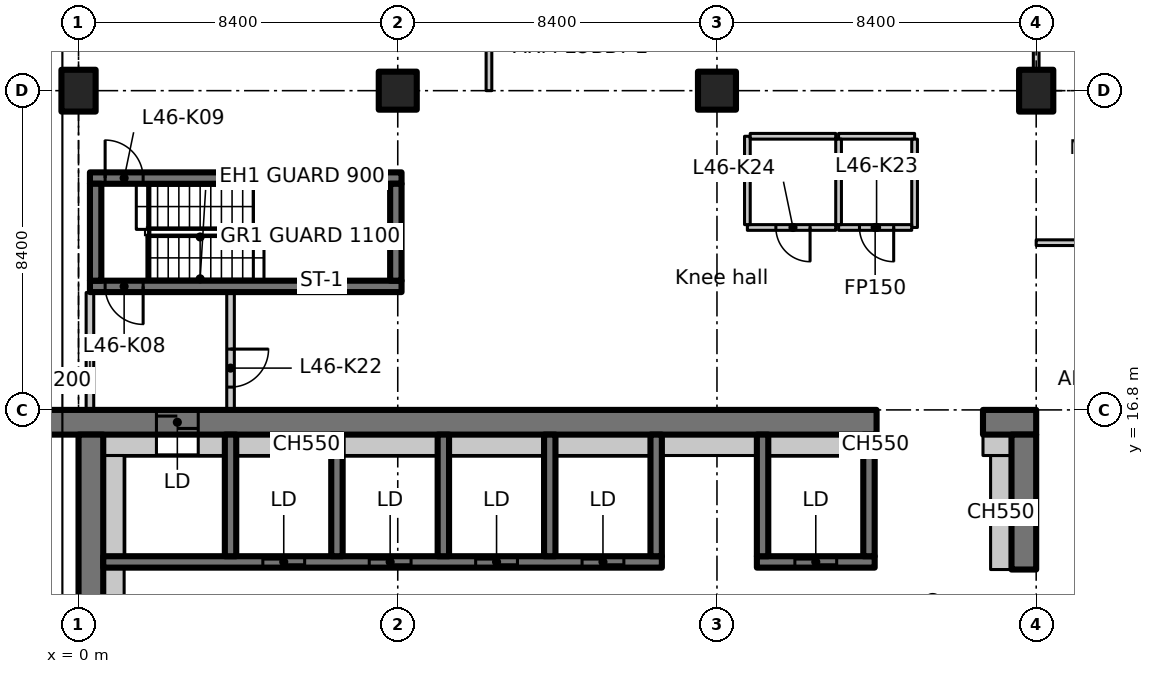
"""IFC4 building model, lengths in metres.
Left out: names, types, materials, properties, quantities, classifications, styles, units other than length and angle.
Written with IfcOpenShell. Run it as: python <this file> out.ifc"""

import sys

from ifc_helpers import new_model, si_unit, direction, frame, frame_2d, origin, origin_2d, place, context, subcontext, project, spatial, polyline, rectangle, outline, extrude, element, fill, save


model = new_model("IFC4")
c1 = context("Model", 3, precision=1e-05, world=origin(), true_north=direction((0.0, 1.0)))
c2 = subcontext(c1, "Body", "Model", "MODEL_VIEW")
j1 = project(units=[si_unit("LENGTHUNIT", "METRE"), si_unit("PLANEANGLEUNIT", "RADIAN")], contexts=[c1])
p1 = place(None, origin())
s1 = spatial("IfcSite", under=j1, at=p1, CompositionType="ELEMENT")
p2 = place(p1, origin())
s2 = spatial("IfcBuilding", under=s1, at=p2, CompositionType="ELEMENT")
p3 = place(p2, frame((0.0, 0.0, 184.8)))
s3 = spatial("IfcBuildingStorey", under=s2, at=p3, CompositionType="ELEMENT", Elevation=184.8)
p4 = place(p3, frame((0.0, 25.2, 0.0), z_axis=(0.0, 0.0, 1.0), x_axis=(1.0, 0.0, 0.0)))
e1 = element("IfcColumn", 1, at=p4, inside=s3, PredefinedType="COLUMN", context=c2, shape_type="SweptSolid", body=[
    extrude(rectangle(XDim=0.9, YDim=1.1, at=origin_2d()), origin(), (0.0, 0.0, 1.0), 3.35),
])
for number, where, z_axis, x_axis in (
    (2, (8.4, 25.2, 0.0), (0.0, 0.0, 1.0), (1.0, 0.0, 0.0)),
    (3, (16.8, 25.2, 0.0), (0.0, 0.0, 1.0), (1.0, 0.0, 0.0)),
):
    element("IfcColumn", number, at=place(p3, frame(where, z_axis=z_axis, x_axis=x_axis)), inside=s3, PredefinedType="COLUMN", context=c2, shape_type="SweptSolid", body=[
        extrude(rectangle(XDim=1.0, YDim=1.0, at=origin_2d()), origin(), (0.0, 0.0, 1.0), 3.35),
    ])
p5 = place(p3, frame((25.2, 25.2, 0.0), z_axis=(0.0, 0.0, 1.0), x_axis=(1.0, 0.0, 0.0)))
e4 = element("IfcColumn", 4, at=p5, inside=s3, PredefinedType="COLUMN", context=c2, shape_type="SweptSolid", body=[
    extrude(rectangle(XDim=0.9, YDim=1.1, at=origin_2d()), origin(), (0.0, 0.0, 1.0), 3.35),
])
p6 = place(p3, frame((-1.1, 16.475, 0.0), z_axis=(0.0, 0.0, 1.0), x_axis=(1.0, 0.0, 0.0)))
e5 = element("IfcWall", 5, at=p6, inside=s3, PredefinedType="SHEAR", context=c2, shape_type="SweptSolid", body=[
    extrude(rectangle(XDim=22.1, YDim=0.65, at=frame_2d((11.05, 0.0))), origin(), (0.0, 0.0, 1.0), 3.35),
])
p7 = place(p6, frame((3.15, 0.0, 0.0)))
e6 = element("IfcOpeningElement", 6, at=p7, cuts=e5, PredefinedType="OPENING", context=c2, shape_type="SweptSolid", body=[
    extrude(rectangle(XDim=1.1, YDim=2.3, at=frame_2d((0.55, 1.15))), frame((0.0, 0.335, 0.0), z_axis=(0.0, -1.0, 0.0), x_axis=(1.0, 0.0, 0.0)), (0.0, 0.0, 1.0), 0.67),
])
p8 = place(p3, frame((23.8, 16.475, 0.0), z_axis=(0.0, 0.0, 1.0), x_axis=(1.0, 0.0, 0.0)))
e7 = element("IfcWall", 7, at=p8, inside=s3, PredefinedType="SHEAR", context=c2, shape_type="SweptSolid", body=[
    extrude(rectangle(XDim=1.4, YDim=0.65, at=frame_2d((0.7, 0.0))), origin(), (0.0, 0.0, 1.0), 3.35),
])
p9 = place(p3, frame((0.325, 7.286, 0.0), z_axis=(0.0, 0.0, 1.0), x_axis=(0.0, 1.0, 0.0)))
e8 = element("IfcWall", 8, at=p9, inside=s3, PredefinedType="SHEAR", context=c2, shape_type="SweptSolid", body=[
    extrude(rectangle(XDim=8.864, YDim=0.65, at=frame_2d((4.432, 0.0))), origin(), (0.0, 0.0, 1.0), 3.35),
])
p10 = place(p3, frame((24.875, 12.6, 0.0), z_axis=(0.0, 0.0, 1.0), x_axis=(0.0, 1.0, 0.0)))
e9 = element("IfcWall", 9, at=p10, inside=s3, PredefinedType="SHEAR", context=c2, shape_type="SweptSolid", body=[
    extrude(rectangle(XDim=3.55, YDim=0.65, at=frame_2d((1.775, 0.0))), origin(), (0.0, 0.0, 1.0), 3.35),
])
p11 = place(p3, frame((24.275, 12.6, 0.0), z_axis=(0.0, 0.0, 1.0), x_axis=(0.0, 1.0, 0.0)))
e10 = element("IfcWall", 10, at=p11, inside=s3, PredefinedType="PARTITIONING", context=c2, shape_type="SweptSolid", body=[
    extrude(rectangle(XDim=3.0, YDim=0.55, at=frame_2d((1.5, 0.0))), origin(), (0.0, 0.0, 1.0), 3.35),
])
p12 = place(p3, frame((0.65, 15.875, 0.0), z_axis=(0.0, 0.0, 1.0), x_axis=(1.0, 0.0, 0.0)))
e11 = element("IfcWall", 11, at=p12, inside=s3, PredefinedType="PARTITIONING", context=c2, shape_type="SweptSolid", body=[
    extrude(rectangle(XDim=1.4, YDim=0.55, at=frame_2d((0.7, 0.0))), origin(), (0.0, 0.0, 1.0), 3.35),
])
p13 = place(p3, frame((23.8, 15.875, 0.0), z_axis=(0.0, 0.0, 1.0), x_axis=(1.0, 0.0, 0.0)))
e12 = element("IfcWall", 12, at=p13, inside=s3, PredefinedType="PARTITIONING", context=c2, shape_type="SweptSolid", body=[
    extrude(rectangle(XDim=0.75, YDim=0.55, at=frame_2d((0.375, 0.0))), origin(), (0.0, 0.0, 1.0), 3.35),
])
p14 = place(p3, frame((0.65, 12.8, 0.0), z_axis=(0.0, 0.0, 1.0), x_axis=(1.0, 0.0, 0.0)))
e13 = element("IfcWall", 13, at=p14, inside=s3, PredefinedType="SHEAR", context=c2, shape_type="SweptSolid", body=[
    extrude(rectangle(XDim=14.7, YDim=0.3, at=frame_2d((7.35, 0.0))), origin(), (0.0, 0.0, 1.0), 3.35),
])
p15 = place(p14, frame((4.2, 0.0, 0.0)))
e14 = element("IfcOpeningElement", 14, at=p15, cuts=e13, PredefinedType="OPENING", context=c2, shape_type="SweptSolid", body=[
    extrude(rectangle(XDim=1.1, YDim=2.3, at=frame_2d((0.55, 1.15))), frame((0.0, 0.16, 0.0), z_axis=(0.0, -1.0, 0.0), x_axis=(1.0, 0.0, 0.0)), (0.0, 0.0, 1.0), 0.32),
])
p16 = place(p14, frame((7.0, 0.0, 0.0)))
e15 = element("IfcOpeningElement", 15, at=p16, cuts=e13, PredefinedType="OPENING", context=c2, shape_type="SweptSolid", body=[
    extrude(rectangle(XDim=1.1, YDim=2.3, at=frame_2d((0.55, 1.15))), frame((0.0, 0.16, 0.0), z_axis=(0.0, -1.0, 0.0), x_axis=(1.0, 0.0, 0.0)), (0.0, 0.0, 1.0), 0.32),
])
p17 = place(p14, frame((9.8, 0.0, 0.0)))
e16 = element("IfcOpeningElement", 16, at=p17, cuts=e13, PredefinedType="OPENING", context=c2, shape_type="SweptSolid", body=[
    extrude(rectangle(XDim=1.1, YDim=2.3, at=frame_2d((0.55, 1.15))), frame((0.0, 0.16, 0.0), z_axis=(0.0, -1.0, 0.0), x_axis=(1.0, 0.0, 0.0)), (0.0, 0.0, 1.0), 0.32),
])
p18 = place(p14, frame((12.6, 0.0, 0.0)))
e17 = element("IfcOpeningElement", 17, at=p18, cuts=e13, PredefinedType="OPENING", context=c2, shape_type="SweptSolid", body=[
    extrude(rectangle(XDim=1.1, YDim=2.3, at=frame_2d((0.55, 1.15))), frame((0.0, 0.16, 0.0), z_axis=(0.0, -1.0, 0.0), x_axis=(1.0, 0.0, 0.0)), (0.0, 0.0, 1.0), 0.32),
])
for number, where, z_axis, x_axis in (
    (18, (4.0, 12.95, 0.0), (0.0, 0.0, 1.0), (0.0, 1.0, 0.0)),
    (19, (6.8, 12.95, 0.0), (0.0, 0.0, 1.0), (0.0, 1.0, 0.0)),
    (20, (9.6, 12.95, 0.0), (0.0, 0.0, 1.0), (0.0, 1.0, 0.0)),
    (21, (12.4, 12.95, 0.0), (0.0, 0.0, 1.0), (0.0, 1.0, 0.0)),
    (22, (15.2, 12.95, 0.0), (0.0, 0.0, 1.0), (0.0, 1.0, 0.0)),
):
    element("IfcWall", number, at=place(p3, frame(where, z_axis=z_axis, x_axis=x_axis)), inside=s3, PredefinedType="SHEAR", context=c2, shape_type="SweptSolid", body=[
        extrude(rectangle(XDim=3.2, YDim=0.3, at=frame_2d((1.6, 0.0))), origin(), (0.0, 0.0, 1.0), 3.35),
    ])
p19 = place(p3, frame((17.85, 12.8, 0.0), z_axis=(0.0, 0.0, 1.0), x_axis=(1.0, 0.0, 0.0)))
e23 = element("IfcWall", 23, at=p19, inside=s3, PredefinedType="SHEAR", context=c2, shape_type="SweptSolid", body=[
    extrude(rectangle(XDim=3.1, YDim=0.3, at=frame_2d((1.55, 0.0))), origin(), (0.0, 0.0, 1.0), 3.35),
])
p20 = place(p19, frame((1.0, 0.0, 0.0)))
e24 = element("IfcOpeningElement", 24, at=p20, cuts=e23, PredefinedType="OPENING", context=c2, shape_type="SweptSolid", body=[
    extrude(rectangle(XDim=1.1, YDim=2.3, at=frame_2d((0.55, 1.15))), frame((0.0, 0.16, 0.0), z_axis=(0.0, -1.0, 0.0), x_axis=(1.0, 0.0, 0.0)), (0.0, 0.0, 1.0), 0.32),
])
for number, where, z_axis, x_axis in (
    (25, (18.0, 12.95, 0.0), (0.0, 0.0, 1.0), (0.0, 1.0, 0.0)),
    (26, (20.8, 12.95, 0.0), (0.0, 0.0, 1.0), (0.0, 1.0, 0.0)),
):
    element("IfcWall", number, at=place(p3, frame(where, z_axis=z_axis, x_axis=x_axis)), inside=s3, PredefinedType="SHEAR", context=c2, shape_type="SweptSolid", body=[
        extrude(rectangle(XDim=3.2, YDim=0.3, at=frame_2d((1.6, 0.0))), origin(), (0.0, 0.0, 1.0), 3.35),
    ])
p21 = place(p3, frame((8.5, 20.05, 0.0), z_axis=(0.0, 0.0, 1.0), x_axis=(-1.0, 0.0, 0.0)))
e27 = element("IfcWall", 27, at=p21, inside=s3, PredefinedType="SHEAR", context=c2, shape_type="SweptSolid", body=[
    extrude(rectangle(XDim=8.2, YDim=0.3, at=frame_2d((4.1, 0.0))), origin(), (0.0, 0.0, 1.0), 3.35),
])
p22 = place(p21, frame((6.8, 0.0, 0.0)))
e28 = element("IfcOpeningElement", 28, at=p22, cuts=e27, PredefinedType="OPENING", context=c2, shape_type="SweptSolid", body=[
    extrude(rectangle(XDim=1.0, YDim=2.1, at=frame_2d((0.5, 1.05))), frame((0.0, 0.16, 0.0), z_axis=(0.0, -1.0, 0.0), x_axis=(1.0, 0.0, 0.0)), (0.0, 0.0, 1.0), 0.32),
])
p23 = place(p3, frame((0.3, 22.9, 0.0), z_axis=(0.0, 0.0, 1.0), x_axis=(1.0, 0.0, 0.0)))
e29 = element("IfcWall", 29, at=p23, inside=s3, PredefinedType="SHEAR", context=c2, shape_type="SweptSolid", body=[
    extrude(rectangle(XDim=8.2, YDim=0.3, at=frame_2d((4.1, 0.0))), origin(), (0.0, 0.0, 1.0), 3.35),
])
p24 = place(p23, frame((0.4, 0.0, 0.0)))
e30 = element("IfcOpeningElement", 30, at=p24, cuts=e29, PredefinedType="OPENING", context=c2, shape_type="SweptSolid", body=[
    extrude(rectangle(XDim=1.0, YDim=2.1, at=frame_2d((0.5, 1.05))), frame((0.0, 0.16, 0.0), z_axis=(0.0, -1.0, 0.0), x_axis=(1.0, 0.0, 0.0)), (0.0, 0.0, 1.0), 0.32),
])
for number, where, z_axis, x_axis in (
    (31, (0.45, 20.2, 0.0), (0.0, 0.0, 1.0), (0.0, 1.0, 0.0)),
    (32, (8.35, 20.2, 0.0), (0.0, 0.0, 1.0), (0.0, 1.0, 0.0)),
):
    element("IfcWall", number, at=place(p3, frame(where, z_axis=z_axis, x_axis=x_axis)), inside=s3, PredefinedType="SHEAR", context=c2, shape_type="SweptSolid", body=[
        extrude(rectangle(XDim=2.55, YDim=0.3, at=frame_2d((1.275, 0.0))), origin(), (0.0, 0.0, 1.0), 3.35),
    ])
p25 = place(p3, frame((0.3, 16.812, 0.0), z_axis=(0.0, 0.0, 1.0), x_axis=(0.0, 1.0, 0.0)))
e33 = element("IfcWall", 33, at=p25, inside=s3, PredefinedType="PARTITIONING", context=c2, shape_type="SweptSolid", body=[
    extrude(rectangle(XDim=3.076, YDim=0.2, at=frame_2d((1.538, 0.0))), origin(), (0.0, 0.0, 1.0), 2.98),
])
p26 = place(p3, frame((4.0, 19.888, 0.0), z_axis=(0.0, 0.0, 1.0), x_axis=(0.0, -1.0, 0.0)))
e34 = element("IfcWall", 34, at=p26, inside=s3, PredefinedType="PARTITIONING", context=c2, shape_type="SweptSolid", body=[
    extrude(rectangle(XDim=3.076, YDim=0.2, at=frame_2d((1.538, 0.0))), origin(), (0.0, 0.0, 1.0), 3.35),
])
p27 = place(p26, frame((1.488, 0.0, 0.0)))
e35 = element("IfcOpeningElement", 35, at=p27, cuts=e34, PredefinedType="OPENING", context=c2, shape_type="SweptSolid", body=[
    extrude(rectangle(XDim=1.0, YDim=2.1, at=frame_2d((0.5, 1.05))), frame((0.0, 0.11, 0.0), z_axis=(0.0, -1.0, 0.0), x_axis=(1.0, 0.0, 0.0)), (0.0, 0.0, 1.0), 0.22),
])
p28 = place(p3, frame((20.0, 24.0, 0.0), z_axis=(0.0, 0.0, 1.0), x_axis=(1.0, 0.0, 0.0)))
e36 = element("IfcWall", 36, at=p28, inside=s3, PredefinedType="PARTITIONING", context=c2, shape_type="SweptSolid", body=[
    extrude(rectangle(XDim=2.0, YDim=0.15, at=frame_2d((1.0, 0.0))), origin(), (0.0, 0.0, 1.0), 3.35),
])
p29 = place(p3, frame((22.0, 23.925, 0.0), z_axis=(0.0, 0.0, 1.0), x_axis=(0.0, -1.0, 0.0)))
e37 = element("IfcWall", 37, at=p29, inside=s3, PredefinedType="PARTITIONING", context=c2, shape_type="SweptSolid", body=[
    extrude(rectangle(XDim=2.325, YDim=0.15, at=frame_2d((1.163, 0.0))), origin(), (0.0, 0.0, 1.0), 3.35),
])
p30 = place(p3, frame((21.925, 21.6, 0.0), z_axis=(0.0, 0.0, 1.0), x_axis=(-1.0, 0.0, 0.0)))
e38 = element("IfcWall", 38, at=p30, inside=s3, PredefinedType="PARTITIONING", context=c2, shape_type="SweptSolid", body=[
    extrude(rectangle(XDim=1.925, YDim=0.15, at=frame_2d((0.962, 0.0))), origin(), (0.0, 0.0, 1.0), 3.35),
])
p31 = place(p30, frame((0.475, 0.0, 0.0)))
e39 = element("IfcOpeningElement", 39, at=p31, cuts=e38, PredefinedType="OPENING", context=c2, shape_type="SweptSolid", body=[
    extrude(rectangle(XDim=0.9, YDim=2.1, at=frame_2d((0.45, 1.05))), frame((0.0, 0.085, 0.0), z_axis=(0.0, -1.0, 0.0), x_axis=(1.0, 0.0, 0.0)), (0.0, 0.0, 1.0), 0.17),
])
p32 = place(p3, frame((20.0, 21.675, 0.0), z_axis=(0.0, 0.0, 1.0), x_axis=(0.0, 1.0, 0.0)))
e40 = element("IfcWall", 40, at=p32, inside=s3, PredefinedType="PARTITIONING", context=c2, shape_type="SweptSolid", body=[
    extrude(rectangle(XDim=2.25, YDim=0.15, at=frame_2d((1.125, 0.0))), origin(), (0.0, 0.0, 1.0), 3.35),
])
p33 = place(p3, frame((19.925, 21.6, 0.0), z_axis=(0.0, 0.0, 1.0), x_axis=(-1.0, 0.0, 0.0)))
e41 = element("IfcWall", 41, at=p33, inside=s3, PredefinedType="PARTITIONING", context=c2, shape_type="SweptSolid", body=[
    extrude(rectangle(XDim=2.325, YDim=0.15, at=frame_2d((1.163, 0.0))), origin(), (0.0, 0.0, 1.0), 3.35),
])
p34 = place(p33, frame((0.675, 0.0, 0.0)))
e42 = element("IfcOpeningElement", 42, at=p34, cuts=e41, PredefinedType="OPENING", context=c2, shape_type="SweptSolid", body=[
    extrude(rectangle(XDim=0.9, YDim=2.1, at=frame_2d((0.45, 1.05))), frame((0.0, 0.085, 0.0), z_axis=(0.0, -1.0, 0.0), x_axis=(1.0, 0.0, 0.0)), (0.0, 0.0, 1.0), 0.17),
])
p35 = place(p3, frame((17.6, 21.675, 0.0), z_axis=(0.0, 0.0, 1.0), x_axis=(0.0, 1.0, 0.0)))
e43 = element("IfcWall", 43, at=p35, inside=s3, PredefinedType="PARTITIONING", context=c2, shape_type="SweptSolid", body=[
    extrude(rectangle(XDim=2.325, YDim=0.15, at=frame_2d((1.163, 0.0))), origin(), (0.0, 0.0, 1.0), 3.35),
])
p36 = place(p3, frame((17.675, 24.0, 0.0), z_axis=(0.0, 0.0, 1.0), x_axis=(1.0, 0.0, 0.0)))
e44 = element("IfcWall", 44, at=p36, inside=s3, PredefinedType="PARTITIONING", context=c2, shape_type="SweptSolid", body=[
    extrude(rectangle(XDim=2.25, YDim=0.15, at=frame_2d((1.125, 0.0))), origin(), (0.0, 0.0, 1.0), 3.35),
])
p37 = place(p3, frame((0.925, 7.286, 0.0), z_axis=(0.0, 0.0, 1.0), x_axis=(0.0, 1.0, 0.0)))
e45 = element("IfcWall", 45, at=p37, inside=s3, PredefinedType="PARTITIONING", context=c2, shape_type="SweptSolid", body=[
    extrude(rectangle(XDim=5.364, YDim=0.55, at=frame_2d((2.682, 0.0))), origin(), (0.0, 0.0, 1.0), 3.35),
])
p38 = place(p3, frame((0.925, 12.95, 0.0), z_axis=(0.0, 0.0, 1.0), x_axis=(0.0, 1.0, 0.0)))
e46 = element("IfcWall", 46, at=p38, inside=s3, PredefinedType="PARTITIONING", context=c2, shape_type="SweptSolid", body=[
    extrude(rectangle(XDim=2.65, YDim=0.55, at=frame_2d((1.325, 0.0))), origin(), (0.0, 0.0, 1.0), 3.35),
])
p39 = place(p3, frame((3.15, 15.875, 0.0), z_axis=(0.0, 0.0, 1.0), x_axis=(1.0, 0.0, 0.0)))
e47 = element("IfcWall", 47, at=p39, inside=s3, PredefinedType="PARTITIONING", context=c2, shape_type="SweptSolid", body=[
    extrude(rectangle(XDim=0.7, YDim=0.55, at=frame_2d((0.35, 0.0))), origin(), (0.0, 0.0, 1.0), 3.35),
])
for number, where, z_axis, x_axis in (
    (48, (4.15, 15.875, 0.0), (0.0, 0.0, 1.0), (1.0, 0.0, 0.0)),
    (49, (6.95, 15.875, 0.0), (0.0, 0.0, 1.0), (1.0, 0.0, 0.0)),
    (50, (9.75, 15.875, 0.0), (0.0, 0.0, 1.0), (1.0, 0.0, 0.0)),
    (51, (12.55, 15.875, 0.0), (0.0, 0.0, 1.0), (1.0, 0.0, 0.0)),
    (52, (15.35, 15.875, 0.0), (0.0, 0.0, 1.0), (1.0, 0.0, 0.0)),
    (53, (18.15, 15.875, 0.0), (0.0, 0.0, 1.0), (1.0, 0.0, 0.0)),
):
    element("IfcWall", number, at=place(p3, frame(where, z_axis=z_axis, x_axis=x_axis)), inside=s3, PredefinedType="PARTITIONING", context=c2, shape_type="SweptSolid", body=[
        extrude(rectangle(XDim=2.5, YDim=0.55, at=frame_2d((1.25, 0.0))), origin(), (0.0, 0.0, 1.0), 3.35),
    ])
p40 = place(p3, frame((20.95, 15.875, 0.0), z_axis=(0.0, 0.0, 1.0), x_axis=(1.0, 0.0, 0.0)))
e54 = element("IfcWall", 54, at=p40, inside=s3, PredefinedType="PARTITIONING", context=c2, shape_type="SweptSolid", body=[
    extrude(rectangle(XDim=0.05, YDim=0.55, at=frame_2d((0.025, 0.0))), origin(), (0.0, 0.0, 1.0), 3.35),
])
p41 = place(p3, frame((25.2, 21.2, 0.0), z_axis=(0.0, 0.0, 1.0), x_axis=(1.0, 0.0, 0.0)))
e55 = element("IfcWall", 55, at=p41, inside=s3, PredefinedType="PARTITIONING", context=c2, shape_type="SweptSolid", body=[
    extrude(rectangle(XDim=4.2, YDim=0.15, at=frame_2d((2.1, 0.0))), origin(), (0.0, 0.0, 1.0), 3.33),
])
p42 = place(p3, frame((25.2, 31.0, 0.0), z_axis=(0.0, 0.0, 1.0), x_axis=(0.0, -1.0, 0.0)))
e56 = element("IfcWall", 56, at=p42, inside=s3, PredefinedType="PARTITIONING", context=c2, shape_type="SweptSolid", body=[
    extrude(outline(polyline([(0.0, 0.0), (5.23, 0.0), (5.23, 2.98), (0.0, 2.98), (0.0, 0.0)])), frame((0.0, 0.075, 0.0), z_axis=(0.0, -1.0, 0.0), x_axis=(1.0, 0.0, 0.0)), (0.0, 0.0, 1.0), 0.15),
])
p43 = place(p42, frame((2.03, 0.0, 0.0)))
e57 = element("IfcOpeningElement", 57, at=p43, cuts=e56, PredefinedType="OPENING", context=c2, shape_type="SweptSolid", body=[
    extrude(rectangle(XDim=1.1, YDim=2.1, at=frame_2d((0.55, 1.05))), frame((0.0, 0.085, 0.0), z_axis=(0.0, -1.0, 0.0), x_axis=(1.0, 0.0, 0.0)), (0.0, 0.0, 1.0), 0.17),
])
p44 = place(p3, frame((10.8, 25.2, 0.0), z_axis=(0.0, 0.0, 1.0), x_axis=(0.0, 1.0, 0.0)))
e58 = element("IfcWall", 58, at=p44, inside=s3, PredefinedType="PARTITIONING", context=c2, shape_type="SweptSolid", body=[
    extrude(rectangle(XDim=8.4, YDim=0.15, at=frame_2d((4.2, 0.0))), origin(), (0.0, 0.0, 1.0), 3.33),
])
p45 = place(p44, frame((3.3, 0.0, 0.0)))
e59 = element("IfcOpeningElement", 59, at=p45, cuts=e58, PredefinedType="OPENING", context=c2, shape_type="SweptSolid", body=[
    extrude(rectangle(XDim=1.6, YDim=2.1, at=frame_2d((0.8, 1.05))), frame((0.0, 0.085, 0.0), z_axis=(0.0, -1.0, 0.0), x_axis=(1.0, 0.0, 0.0)), (0.0, 0.0, 1.0), 0.17),
])
p46 = place(p7, origin())
e60 = element("IfcDoor", 60, at=p46, inside=s3, OperationType="SLIDING_TO_LEFT", PredefinedType="DOOR", context=c2, shape_type="SweptSolid", body=[
    extrude(rectangle(XDim=1.1, YDim=2.3, at=frame_2d((0.55, 1.15))), frame((0.0, 0.025, 0.0), z_axis=(0.0, -1.0, 0.0), x_axis=(1.0, 0.0, 0.0)), (0.0, 0.0, 1.0), 0.05),
])
fill(e6, e60)
p47 = place(p15, origin())
e61 = element("IfcDoor", 61, at=p47, inside=s3, OperationType="SLIDING_TO_LEFT", PredefinedType="DOOR", context=c2, shape_type="SweptSolid", body=[
    extrude(rectangle(XDim=1.1, YDim=2.3, at=frame_2d((0.55, 1.15))), frame((0.0, 0.025, 0.0), z_axis=(0.0, -1.0, 0.0), x_axis=(1.0, 0.0, 0.0)), (0.0, 0.0, 1.0), 0.05),
])
fill(e14, e61)
p48 = place(p16, origin())
e62 = element("IfcDoor", 62, at=p48, inside=s3, OperationType="SLIDING_TO_LEFT", PredefinedType="DOOR", context=c2, shape_type="SweptSolid", body=[
    extrude(rectangle(XDim=1.1, YDim=2.3, at=frame_2d((0.55, 1.15))), frame((0.0, 0.025, 0.0), z_axis=(0.0, -1.0, 0.0), x_axis=(1.0, 0.0, 0.0)), (0.0, 0.0, 1.0), 0.05),
])
fill(e15, e62)
p49 = place(p17, origin())
e63 = element("IfcDoor", 63, at=p49, inside=s3, OperationType="SLIDING_TO_LEFT", PredefinedType="DOOR", context=c2, shape_type="SweptSolid", body=[
    extrude(rectangle(XDim=1.1, YDim=2.3, at=frame_2d((0.55, 1.15))), frame((0.0, 0.025, 0.0), z_axis=(0.0, -1.0, 0.0), x_axis=(1.0, 0.0, 0.0)), (0.0, 0.0, 1.0), 0.05),
])
fill(e16, e63)
p50 = place(p18, origin())
e64 = element("IfcDoor", 64, at=p50, inside=s3, OperationType="SLIDING_TO_LEFT", PredefinedType="DOOR", context=c2, shape_type="SweptSolid", body=[
    extrude(rectangle(XDim=1.1, YDim=2.3, at=frame_2d((0.55, 1.15))), frame((0.0, 0.025, 0.0), z_axis=(0.0, -1.0, 0.0), x_axis=(1.0, 0.0, 0.0)), (0.0, 0.0, 1.0), 0.05),
])
fill(e17, e64)
p51 = place(p20, origin())
e65 = element("IfcDoor", 65, at=p51, inside=s3, OperationType="SLIDING_TO_LEFT", PredefinedType="DOOR", context=c2, shape_type="SweptSolid", body=[
    extrude(rectangle(XDim=1.1, YDim=2.3, at=frame_2d((0.55, 1.15))), frame((0.0, 0.025, 0.0), z_axis=(0.0, -1.0, 0.0), x_axis=(1.0, 0.0, 0.0)), (0.0, 0.0, 1.0), 0.05),
])
fill(e24, e65)
p52 = place(p22, origin())
e66 = element("IfcDoor", 66, at=p52, inside=s3, OperationType="SINGLE_SWING_LEFT", PredefinedType="DOOR", context=c2, shape_type="SweptSolid", body=[
    extrude(rectangle(XDim=1.0, YDim=2.1, at=frame_2d((0.5, 1.05))), frame((0.0, 0.025, 0.0), z_axis=(0.0, -1.0, 0.0), x_axis=(1.0, 0.0, 0.0)), (0.0, 0.0, 1.0), 0.05),
])
fill(e28, e66)
p53 = place(p24, origin())
e67 = element("IfcDoor", 67, at=p53, inside=s3, OperationType="SINGLE_SWING_RIGHT", PredefinedType="DOOR", context=c2, shape_type="SweptSolid", body=[
    extrude(rectangle(XDim=1.0, YDim=2.1, at=frame_2d((0.5, 1.05))), frame((0.0, 0.025, 0.0), z_axis=(0.0, -1.0, 0.0), x_axis=(1.0, 0.0, 0.0)), (0.0, 0.0, 1.0), 0.05),
])
fill(e30, e67)
p54 = place(p27, origin())
e68 = element("IfcDoor", 68, at=p54, inside=s3, OperationType="SINGLE_SWING_LEFT", PredefinedType="DOOR", context=c2, shape_type="SweptSolid", body=[
    extrude(rectangle(XDim=1.0, YDim=2.1, at=frame_2d((0.5, 1.05))), frame((0.0, 0.025, 0.0), z_axis=(0.0, -1.0, 0.0), x_axis=(1.0, 0.0, 0.0)), (0.0, 0.0, 1.0), 0.05),
])
fill(e35, e68)
p55 = place(p31, origin())
e69 = element("IfcDoor", 69, at=p55, inside=s3, OperationType="SINGLE_SWING_RIGHT", PredefinedType="DOOR", context=c2, shape_type="SweptSolid", body=[
    extrude(rectangle(XDim=0.9, YDim=2.1, at=frame_2d((0.45, 1.05))), frame((0.0, 0.025, 0.0), z_axis=(0.0, -1.0, 0.0), x_axis=(1.0, 0.0, 0.0)), (0.0, 0.0, 1.0), 0.05),
])
fill(e39, e69)
p56 = place(p34, origin())
e70 = element("IfcDoor", 70, at=p56, inside=s3, OperationType="SINGLE_SWING_LEFT", PredefinedType="DOOR", context=c2, shape_type="SweptSolid", body=[
    extrude(rectangle(XDim=0.9, YDim=2.1, at=frame_2d((0.45, 1.05))), frame((0.0, 0.025, 0.0), z_axis=(0.0, -1.0, 0.0), x_axis=(1.0, 0.0, 0.0)), (0.0, 0.0, 1.0), 0.05),
])
fill(e42, e70)
save(model, sys.argv[1])
